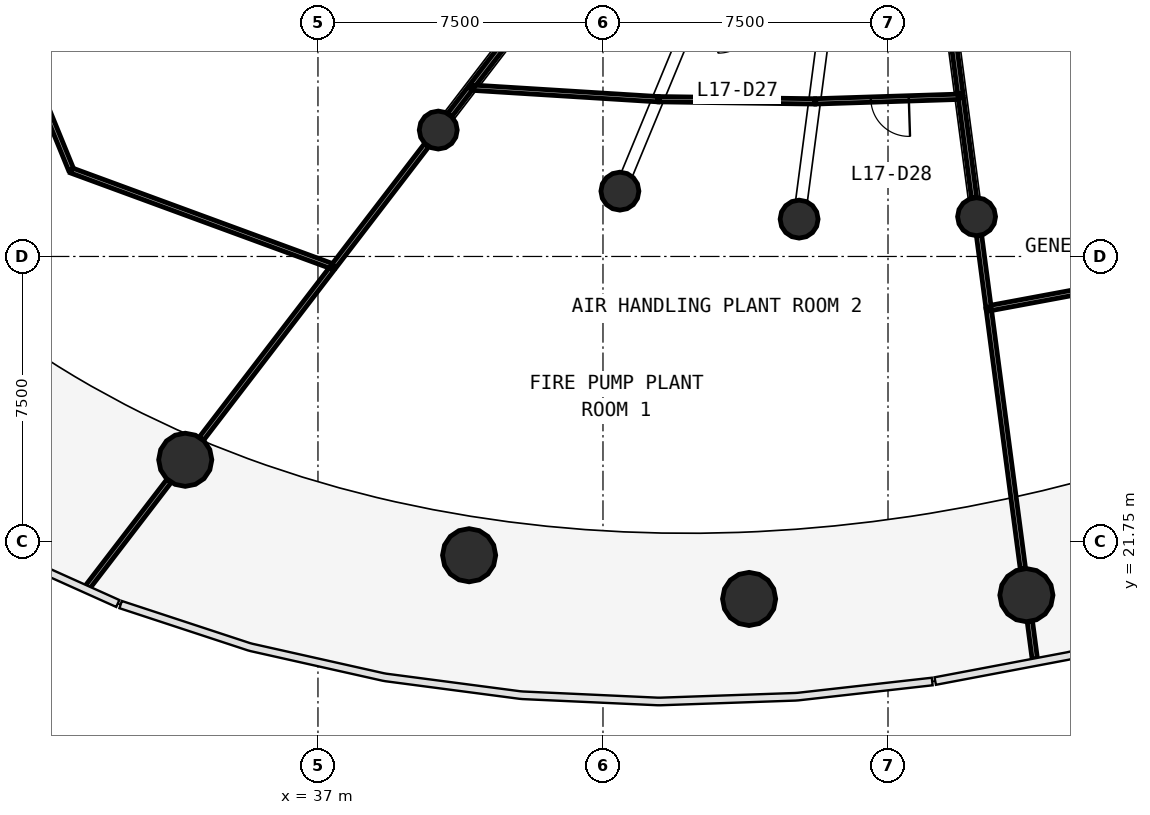
"""IFC4 building model, lengths in metres.
Left out: names, types, materials, properties, quantities, classifications, styles, units other than length and angle.
Written with IfcOpenShell. Run it as: python <this file> out.ifc"""

import sys

from ifc_helpers import new_model, si_unit, direction, frame, frame_2d, origin, origin_2d, place, context, subcontext, project, spatial, rectangle, circle, extrude, source, transform, mapped, element, fill, save


model = new_model("IFC4")
c1 = context("Model", 3, precision=1e-05, world=origin(), true_north=direction((0.0, 1.0)))
c2 = subcontext(c1, "Body", "Model", "MODEL_VIEW")
j1 = project(units=[si_unit("LENGTHUNIT", "METRE"), si_unit("PLANEANGLEUNIT", "RADIAN")], contexts=[c1])
p1 = place(None, origin())
s1 = spatial("IfcSite", under=j1, at=p1, CompositionType="ELEMENT")
p2 = place(p1, origin())
s2 = spatial("IfcBuilding", under=s1, at=p2, CompositionType="ELEMENT")
p3 = place(p2, frame((0.0, 0.0, 75.4)))
s3 = spatial("IfcBuildingStorey", under=s2, at=p3, CompositionType="ELEMENT", Elevation=75.4)
m1 = source(origin(), c2, "Body", "SweptSolid", [
    extrude(circle(Radius=0.7, at=origin_2d()), origin(), (0.0, 0.0, 1.0), 4.0),
])
for number, where, z_axis, x_axis in (
    (1, (33.508, 23.9, 0.0), (0.0, 0.0, 1.0), (1.0, 0.0, 0.0)),
    (2, (40.977, 21.389, 0.0), (0.0, 0.0, 1.0), (1.0, 0.0, 0.0)),
    (3, (48.345, 20.239, 0.0), (0.0, 0.0, 1.0), (1.0, 0.0, 0.0)),
    (4, (55.642, 20.339, 0.0), (0.0, 0.0, 1.0), (1.0, 0.0, 0.0)),
):
    element("IfcColumn", number, at=place(p3, frame(where, z_axis=z_axis, x_axis=x_axis)), inside=s3, PredefinedType="COLUMN", context=c2, shape_type="MappedRepresentation", body=[
        mapped(m1, transform((0.0, 0.0, 0.0), scale=1.0)),
    ])
m2 = source(origin(), c2, "Body", "SweptSolid", [
    extrude(circle(Radius=0.5, at=origin_2d()), origin(), (0.0, 0.0, 1.0), 4.4),
])
for number, where, z_axis, x_axis in (
    (5, (40.165, 32.576, 0.0), (0.0, 0.0, 1.0), (1.0, 0.0, 0.0)),
    (6, (44.945, 30.969, 0.0), (0.0, 0.0, 1.0), (1.0, 0.0, 0.0)),
    (7, (49.661, 30.233, 0.0), (0.0, 0.0, 1.0), (1.0, 0.0, 0.0)),
    (8, (54.331, 30.297, 0.0), (0.0, 0.0, 1.0), (1.0, 0.0, 0.0)),
):
    element("IfcColumn", number, at=place(p3, frame(where, z_axis=z_axis, x_axis=x_axis)), inside=s3, PredefinedType="COLUMN", context=c2, shape_type="MappedRepresentation", body=[
        mapped(m2, transform((0.0, 0.0, 0.0), scale=1.0)),
    ])
p4 = place(p3, frame((30.513, 31.513, 0.0), z_axis=(0.0, 0.0, 1.0), x_axis=(0.938632857677, -0.344917901085, 0.0)))
e9 = element("IfcWall", 9, at=p4, inside=s3, PredefinedType="PARTITIONING", context=c2, shape_type="SweptSolid", body=[
    extrude(rectangle(XDim=7.343, YDim=0.14, at=frame_2d((3.671, 0.0))), origin(), (0.0, 0.0, 1.0), 2.8),
])
p5 = place(p3, frame((27.864, 38.002, 0.0), z_axis=(0.0, 0.0, 1.0), x_axis=(0.377966751533, -0.925819169566, 0.0)))
e10 = element("IfcWall", 10, at=p5, inside=s3, PredefinedType="PARTITIONING", context=c2, shape_type="SweptSolid", body=[
    extrude(rectangle(XDim=6.98, YDim=0.14, at=frame_2d((3.49, 0.0))), origin(), (0.0, 0.0, 1.0), 2.8),
])
p6 = place(p3, frame((54.648, 27.885, 0.0), z_axis=(0.0, 0.0, 1.0), x_axis=(0.130535889274, -0.991443584684, 0.0)))
e11 = element("IfcWall", 11, at=p6, inside=s3, PredefinedType="PARTITIONING", context=c2, shape_type="SweptSolid", body=[
    extrude(rectangle(XDim=6.907, YDim=0.14, at=frame_2d((3.454, 0.0))), origin(), (0.0, 0.0, 1.0), 2.8),
])
p7 = place(p3, frame((37.361, 28.922, 0.0), z_axis=(0.0, 0.0, 1.0), x_axis=(-0.608768603858, -0.793347834784, 0.0)))
e12 = element("IfcWall", 12, at=p7, inside=s3, PredefinedType="PARTITIONING", context=c2, shape_type="SweptSolid", body=[
    extrude(rectangle(XDim=5.625, YDim=0.14, at=frame_2d((2.813, 0.0))), origin(), (0.0, 0.0, 1.0), 2.8),
])
p8 = place(p3, frame((54.678, 27.89, 0.0), z_axis=(0.0, 0.0, 1.0), x_axis=(0.983161003838, 0.182741458164, 0.0)))
e13 = element("IfcWall", 13, at=p8, inside=s3, PredefinedType="PARTITIONING", context=c2, shape_type="SweptSolid", body=[
    extrude(rectangle(XDim=5.308, YDim=0.14, at=frame_2d((2.654, 0.0))), origin(), (0.0, 0.0, 1.0), 2.8),
])
p9 = place(p3, frame((41.022, 33.694, 0.0), z_axis=(0.0, 0.0, 1.0), x_axis=(0.998082686061, -0.061894683005, 0.0)))
e14 = element("IfcWall", 14, at=p9, inside=s3, PredefinedType="PARTITIONING", context=c2, shape_type="SweptSolid", body=[
    extrude(rectangle(XDim=4.935, YDim=0.14, at=frame_2d((2.467, 0.0))), origin(), (0.0, 0.0, 1.0), 2.8),
])
p10 = place(p3, frame((45.978, 33.388, 0.0), z_axis=(0.0, 0.0, 1.0), x_axis=(0.99990083992, -0.01408226999, 0.0)))
e15 = element("IfcWall", 15, at=p10, inside=s3, PredefinedType="PARTITIONING", context=c2, shape_type="SweptSolid", body=[
    extrude(rectangle(XDim=4.092, YDim=0.14, at=frame_2d((2.046, 0.0))), origin(), (0.0, 0.0, 1.0), 2.8),
])
p11 = place(p3, frame((39.858, 32.176, 0.0), z_axis=(0.0, 0.0, 1.0), x_axis=(-0.608766057901, -0.793349788396, 0.0)))
e16 = element("IfcWall", 16, at=p11, inside=s3, PredefinedType="PARTITIONING", context=c2, shape_type="SweptSolid", body=[
    extrude(rectangle(XDim=3.998, YDim=0.14, at=frame_2d((1.999, 0.0))), origin(), (0.0, 0.0, 1.0), 2.8),
])
p12 = place(p3, frame((53.915, 33.454, 0.0), z_axis=(0.0, 0.0, 1.0), x_axis=(-0.999486805555, -0.032033194062, 0.0)))
e17 = element("IfcWall", 17, at=p12, inside=s3, PredefinedType="PARTITIONING", context=c2, shape_type="SweptSolid", body=[
    extrude(rectangle(XDim=3.818, YDim=0.14, at=frame_2d((1.909, 0.0))), origin(), (0.0, 0.0, 1.0), 2.8),
])
p13 = place(p12, frame((1.368, 0.0, 0.0)))
e18 = element("IfcOpeningElement", 18, at=p13, cuts=e17, PredefinedType="OPENING", context=c2, shape_type="SweptSolid", body=[
    extrude(rectangle(XDim=1.0, YDim=2.1, at=frame_2d((0.5, 1.05))), frame((0.0, 0.08, 0.0), z_axis=(0.0, -1.0, 0.0), x_axis=(1.0, 0.0, 0.0)), (0.0, 0.0, 1.0), 0.16),
])
p14 = place(p3, frame((33.079, 23.342, 0.0), z_axis=(0.0, 0.0, 1.0), x_axis=(-0.608803527611, -0.793321035123, 0.0)))
e19 = element("IfcWall", 19, at=p14, inside=s3, PredefinedType="PARTITIONING", context=c2, shape_type="SweptSolid", body=[
    extrude(rectangle(XDim=3.513, YDim=0.14, at=frame_2d((1.756, 0.0))), origin(), (0.0, 0.0, 1.0), 3.1),
])
p15 = place(p3, frame((53.919, 33.424, 0.0), z_axis=(0.0, 0.0, 1.0), x_axis=(0.130564152963, -0.991439863008, 0.0)))
e20 = element("IfcWall", 20, at=p15, inside=s3, PredefinedType="PARTITIONING", context=c2, shape_type="SweptSolid", body=[
    extrude(rectangle(XDim=2.65, YDim=0.14, at=frame_2d((1.325, 0.0))), origin(), (0.0, 0.0, 1.0), 2.8),
])
p16 = place(p3, frame((42.463, 35.571, 0.0), z_axis=(0.0, 0.0, 1.0), x_axis=(-0.608779636854, -0.793339368589, 0.0)))
e21 = element("IfcWall", 21, at=p16, inside=s3, PredefinedType="PARTITIONING", context=c2, shape_type="SweptSolid", body=[
    extrude(rectangle(XDim=2.282, YDim=0.14, at=frame_2d((1.141, 0.0))), origin(), (0.0, 0.0, 1.0), 2.8),
])
p17 = place(p3, frame((53.644, 35.51, 0.0), z_axis=(0.0, 0.0, 1.0), x_axis=(0.130615253494, -0.991433132165, 0.0)))
e22 = element("IfcWall", 22, at=p17, inside=s3, PredefinedType="PARTITIONING", context=c2, shape_type="SweptSolid", body=[
    extrude(rectangle(XDim=2.004, YDim=0.14, at=frame_2d((1.002, 0.0))), origin(), (0.0, 0.0, 1.0), 2.8),
])
p18 = place(p3, frame((54.396, 29.797, 0.0), z_axis=(0.0, 0.0, 1.0), x_axis=(0.130521040556, -0.99144553959, 0.0)))
e23 = element("IfcWall", 23, at=p18, inside=s3, PredefinedType="PARTITIONING", context=c2, shape_type="SweptSolid", body=[
    extrude(rectangle(XDim=1.899, YDim=0.14, at=frame_2d((0.949, 0.0))), origin(), (0.0, 0.0, 1.0), 2.8),
])
p19 = place(p3, frame((55.734, 19.64, 0.0), z_axis=(0.0, 0.0, 1.0), x_axis=(0.13062697631, -0.991431587685, 0.0)))
e24 = element("IfcWall", 24, at=p19, inside=s3, PredefinedType="PARTITIONING", context=c2, shape_type="SweptSolid", body=[
    extrude(rectangle(XDim=0.989, YDim=0.14, at=frame_2d((0.494, 0.0))), origin(), (0.0, 0.0, 1.0), 3.1),
])
p20 = place(p3, frame((41.004, 33.67, 0.0), z_axis=(0.0, 0.0, 1.0), x_axis=(-0.60876565208, -0.793350099797, 0.0)))
e25 = element("IfcWall", 25, at=p20, inside=s3, PredefinedType="PARTITIONING", context=c2, shape_type="SweptSolid", body=[
    extrude(rectangle(XDim=0.874, YDim=0.14, at=frame_2d((0.437, 0.0))), origin(), (0.0, 0.0, 1.0), 2.8),
])
m3 = source(origin(), c2, "Body", "SweptSolid", [
    extrude(rectangle(XDim=1.0, YDim=2.1, at=frame_2d((0.5, 1.05))), frame((0.0, 0.025, 0.0), z_axis=(0.0, -1.0, 0.0), x_axis=(1.0, 0.0, 0.0)), (0.0, 0.0, 1.0), 0.05),
])
p21 = place(p13, origin())
e26 = element("IfcDoor", 26, at=p21, inside=s3, OperationType="SINGLE_SWING_LEFT", PredefinedType="DOOR", context=c2, shape_type="MappedRepresentation", body=[
    mapped(m3, transform((0.0, 0.0, 0.0), scale=1.0)),
])
fill(e18, e26)
save(model, sys.argv[1])
